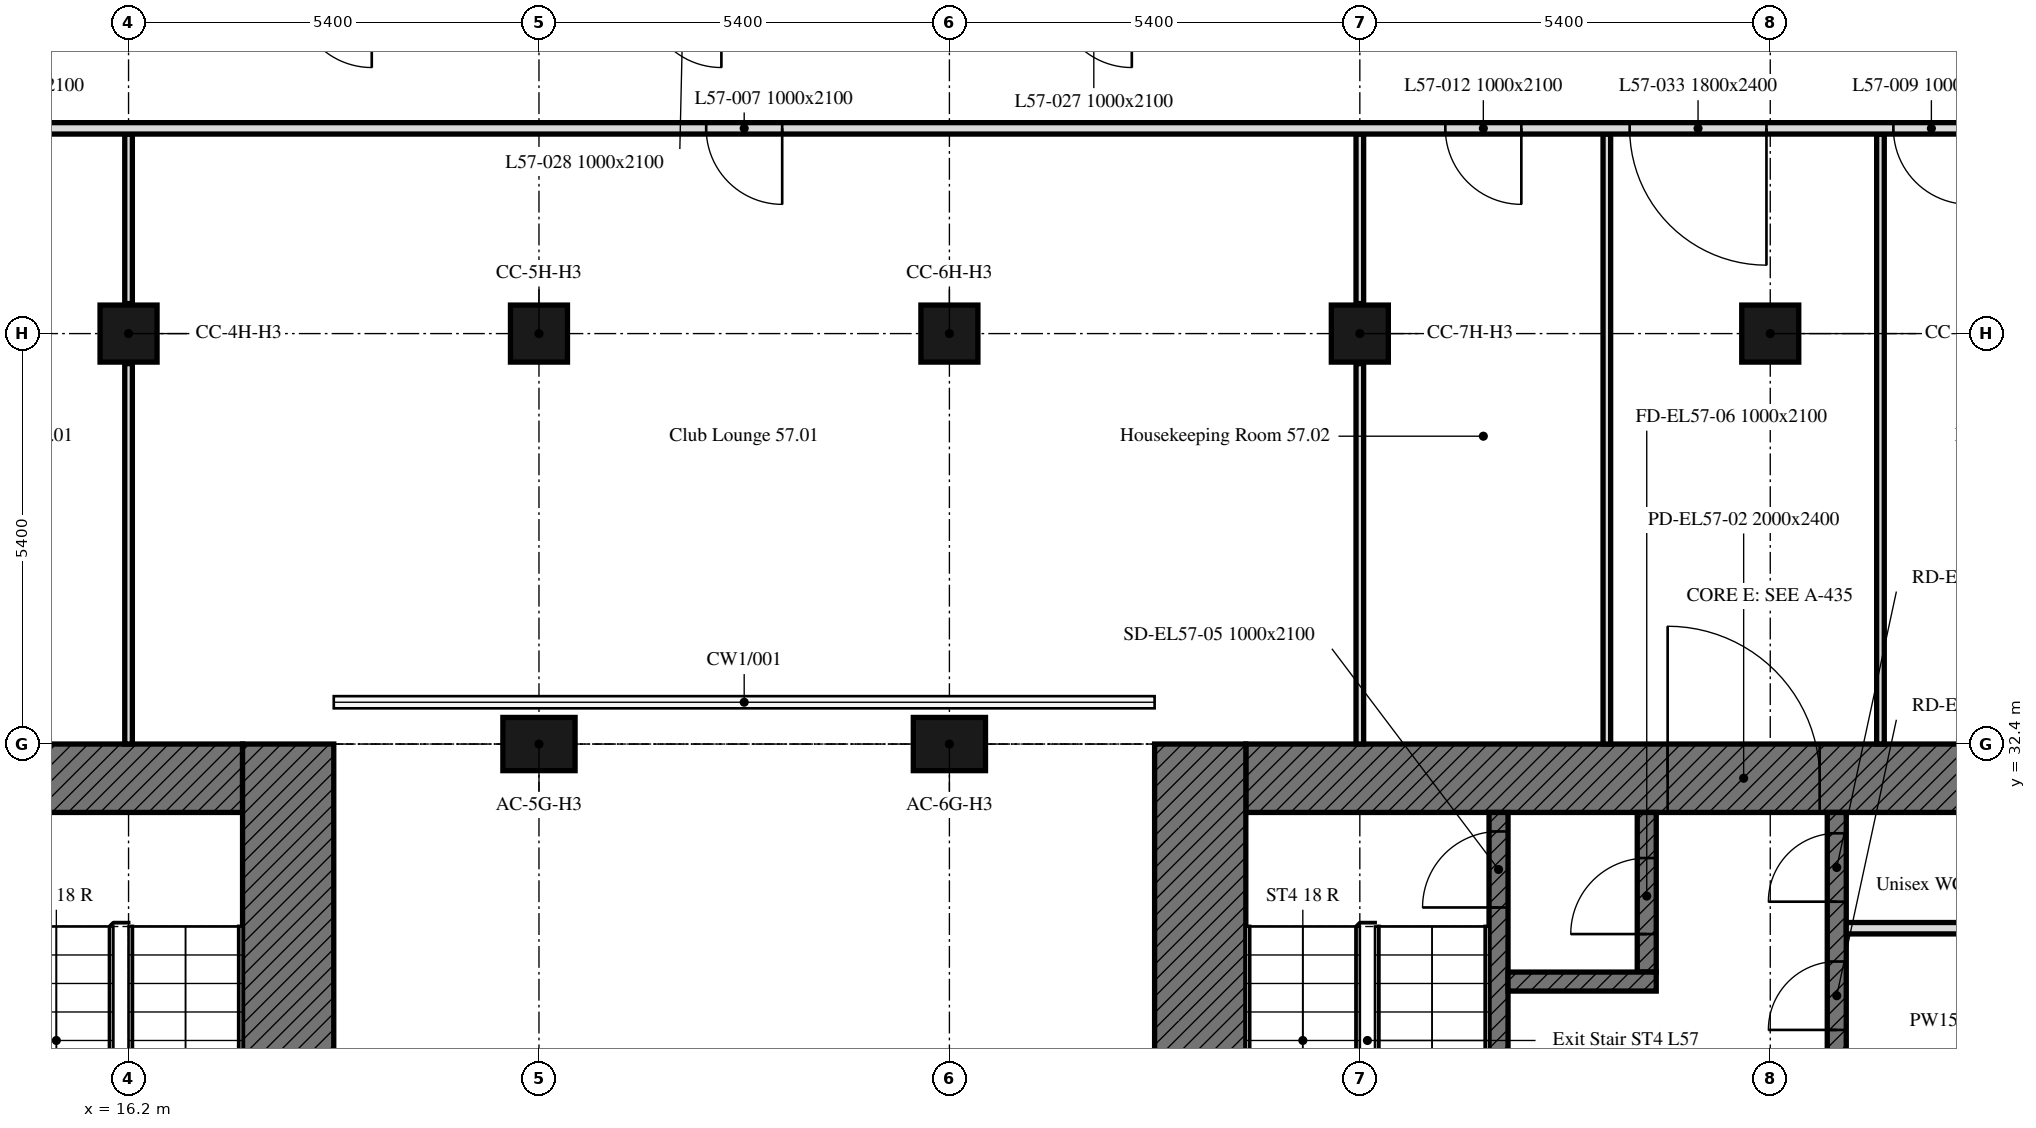
"""IFC4 building model, lengths in metres.
Left out: names, types, materials, properties, quantities, classifications, styles, units other than length and angle.
Written with IfcOpenShell. Run it as: python <this file> out.ifc"""

import sys

from ifc_helpers import new_model, si_unit, direction, frame, frame_2d, origin, origin_2d, place, context, subcontext, project, spatial, rectangle, extrude, element, fill, save


model = new_model("IFC4")
c1 = context("Model", 3, precision=1e-05, world=origin(), true_north=direction((0.0, 1.0)))
c2 = subcontext(c1, "Body", "Model", "MODEL_VIEW")
j1 = project(units=[si_unit("LENGTHUNIT", "METRE"), si_unit("PLANEANGLEUNIT", "RADIAN")], contexts=[c1])
p1 = place(None, origin())
s1 = spatial("IfcSite", under=j1, at=p1, CompositionType="ELEMENT")
p2 = place(p1, origin())
s2 = spatial("IfcBuilding", under=s1, at=p2, CompositionType="ELEMENT")
p3 = place(p2, frame((0.0, 0.0, 226.9)))
s3 = spatial("IfcBuildingStorey", under=s2, at=p3, CompositionType="ELEMENT", Elevation=226.9)
for number, where, z_axis, x_axis in (
    (1, (21.6, 32.4, 0.0), (0.0, 0.0, 1.0), (1.0, 0.0, 0.0)),
    (2, (27.0, 32.4, 0.0), (0.0, 0.0, 1.0), (1.0, 0.0, 0.0)),
):
    element("IfcColumn", number, at=place(p3, frame(where, z_axis=z_axis, x_axis=x_axis)), inside=s3, PredefinedType="COLUMN", context=c2, shape_type="SweptSolid", body=[
        extrude(rectangle(XDim=0.95, YDim=0.7, at=origin_2d()), origin(), (0.0, 0.0, 1.0), 3.0),
    ])
for number, where, z_axis, x_axis in (
    (3, (16.2, 37.8, 0.0), (0.0, 0.0, 1.0), (1.0, 0.0, 0.0)),
    (4, (21.6, 37.8, 0.0), (0.0, 0.0, 1.0), (1.0, 0.0, 0.0)),
    (5, (27.0, 37.8, 0.0), (0.0, 0.0, 1.0), (1.0, 0.0, 0.0)),
    (6, (32.4, 37.8, 0.0), (0.0, 0.0, 1.0), (1.0, 0.0, 0.0)),
    (7, (37.8, 37.8, 0.0), (0.0, 0.0, 1.0), (1.0, 0.0, 0.0)),
):
    element("IfcColumn", number, at=place(p3, frame(where, z_axis=z_axis, x_axis=x_axis)), inside=s3, PredefinedType="COLUMN", context=c2, shape_type="SweptSolid", body=[
        extrude(rectangle(XDim=0.75, YDim=0.75, at=origin_2d()), origin(), (0.0, 0.0, 1.0), 3.0),
    ])
p4 = place(p3, frame((6.6, 31.95, 0.0), z_axis=(0.0, 0.0, 1.0), x_axis=(1.0, 0.0, 0.0)))
e8 = element("IfcWall", 8, at=p4, inside=s3, PredefinedType="SOLIDWALL", context=c2, shape_type="SweptSolid", body=[
    extrude(rectangle(XDim=11.1, YDim=0.9, at=frame_2d((5.55, 0.0))), origin(), (0.0, 0.0, 1.0), 3.0),
])
p5 = place(p4, frame((3.55, 0.0, 0.0)))
e9 = element("IfcOpeningElement", 9, at=p5, cuts=e8, PredefinedType="OPENING", context=c2, shape_type="SweptSolid", body=[
    extrude(rectangle(XDim=2.0, YDim=2.4, at=frame_2d((1.0, 1.2))), frame((0.0, 0.45, 0.0), z_axis=(0.0, -1.0, 0.0), x_axis=(1.0, 0.0, 0.0)), (0.0, 0.0, 1.0), 0.9),
])
p6 = place(p3, frame((18.3, 32.4, 0.0), z_axis=(0.0, 0.0, 1.0), x_axis=(0.0, -1.0, 0.0)))
e10 = element("IfcWall", 10, at=p6, inside=s3, PredefinedType="SOLIDWALL", context=c2, shape_type="SweptSolid", body=[
    extrude(rectangle(XDim=16.2, YDim=1.2, at=frame_2d((8.1, 0.0))), origin(), (0.0, 0.0, 1.0), 3.0),
])
p7 = place(p3, frame((30.9, 31.95, 0.0), z_axis=(0.0, 0.0, 1.0), x_axis=(1.0, 0.0, 0.0)))
e11 = element("IfcWall", 11, at=p7, inside=s3, PredefinedType="SOLIDWALL", context=c2, shape_type="SweptSolid", body=[
    extrude(rectangle(XDim=11.1, YDim=0.9, at=frame_2d((5.55, 0.0))), origin(), (0.0, 0.0, 1.0), 3.0),
])
p8 = place(p7, frame((5.55, 0.0, 0.0)))
e12 = element("IfcOpeningElement", 12, at=p8, cuts=e11, PredefinedType="OPENING", context=c2, shape_type="SweptSolid", body=[
    extrude(rectangle(XDim=2.0, YDim=2.4, at=frame_2d((1.0, 1.2))), frame((0.0, 0.45, 0.0), z_axis=(0.0, -1.0, 0.0), x_axis=(1.0, 0.0, 0.0)), (0.0, 0.0, 1.0), 0.9),
])
p9 = place(p3, frame((30.3, 16.2, 0.0), z_axis=(0.0, 0.0, 1.0), x_axis=(0.0, 1.0, 0.0)))
e13 = element("IfcWall", 13, at=p9, inside=s3, PredefinedType="SOLIDWALL", context=c2, shape_type="SweptSolid", body=[
    extrude(rectangle(XDim=16.2, YDim=1.2, at=frame_2d((8.1, 0.0))), origin(), (0.0, 0.0, 1.0), 3.0),
])
p10 = place(p3, frame((38.675, 17.1, 0.0), z_axis=(0.0, 0.0, 1.0), x_axis=(0.0, 1.0, 0.0)))
e14 = element("IfcWall", 14, at=p10, inside=s3, PredefinedType="SOLIDWALL", context=c2, shape_type="SweptSolid", body=[
    extrude(rectangle(XDim=14.4, YDim=0.25, at=frame_2d((7.2, 0.0))), origin(), (0.0, 0.0, 1.0), 3.0),
])
p11 = place(p10, frame((4.6, 0.0, 0.0)))
e15 = element("IfcOpeningElement", 15, at=p11, cuts=e14, PredefinedType="OPENING", context=c2, shape_type="SweptSolid", body=[
    extrude(rectangle(XDim=1.0, YDim=2.1, at=frame_2d((0.5, 1.05))), frame((0.0, 0.125, 0.0), z_axis=(0.0, -1.0, 0.0), x_axis=(1.0, 0.0, 0.0)), (0.0, 0.0, 1.0), 0.25),
])
p12 = place(p10, frame((7.062, 0.0, 0.0)))
e16 = element("IfcOpeningElement", 16, at=p12, cuts=e14, PredefinedType="OPENING", context=c2, shape_type="SweptSolid", body=[
    extrude(rectangle(XDim=1.2, YDim=2.1, at=frame_2d((0.6, 1.05))), frame((0.0, 0.125, 0.0), z_axis=(0.0, -1.0, 0.0), x_axis=(1.0, 0.0, 0.0)), (0.0, 0.0, 1.0), 0.25),
])
p13 = place(p10, frame((9.726, 0.0, 0.0)))
e17 = element("IfcOpeningElement", 17, at=p13, cuts=e14, PredefinedType="OPENING", context=c2, shape_type="SweptSolid", body=[
    extrude(rectangle(XDim=0.9, YDim=2.1, at=frame_2d((0.45, 1.05))), frame((0.0, 0.125, 0.0), z_axis=(0.0, -1.0, 0.0), x_axis=(1.0, 0.0, 0.0)), (0.0, 0.0, 1.0), 0.25),
])
p14 = place(p10, frame((11.539, 0.0, 0.0)))
e18 = element("IfcOpeningElement", 18, at=p14, cuts=e14, PredefinedType="OPENING", context=c2, shape_type="SweptSolid", body=[
    extrude(rectangle(XDim=0.9, YDim=2.1, at=frame_2d((0.45, 1.05))), frame((0.0, 0.125, 0.0), z_axis=(0.0, -1.0, 0.0), x_axis=(1.0, 0.0, 0.0)), (0.0, 0.0, 1.0), 0.25),
])
p15 = place(p10, frame((13.226, 0.0, 0.0)))
e19 = element("IfcOpeningElement", 19, at=p15, cuts=e14, PredefinedType="OPENING", context=c2, shape_type="SweptSolid", body=[
    extrude(rectangle(XDim=0.9, YDim=2.1, at=frame_2d((0.45, 1.05))), frame((0.0, 0.125, 0.0), z_axis=(0.0, -1.0, 0.0), x_axis=(1.0, 0.0, 0.0)), (0.0, 0.0, 1.0), 0.25),
])
p16 = place(p3, frame((34.225, 17.1, 0.0), z_axis=(0.0, 0.0, 1.0), x_axis=(0.0, 1.0, 0.0)))
e20 = element("IfcWall", 20, at=p16, inside=s3, PredefinedType="SOLIDWALL", context=c2, shape_type="SweptSolid", body=[
    extrude(rectangle(XDim=14.4, YDim=0.25, at=frame_2d((7.2, 0.0))), origin(), (0.0, 0.0, 1.0), 3.0),
])
p17 = place(p16, frame((13.15, 0.0, 0.0)))
e21 = element("IfcOpeningElement", 21, at=p17, cuts=e20, PredefinedType="OPENING", context=c2, shape_type="SweptSolid", body=[
    extrude(rectangle(XDim=1.0, YDim=2.1, at=frame_2d((0.5, 1.05))), frame((0.0, 0.125, 0.0), z_axis=(0.0, -1.0, 0.0), x_axis=(1.0, 0.0, 0.0)), (0.0, 0.0, 1.0), 0.25),
])
p18 = place(p16, frame((0.6, 0.0, 0.0)))
e22 = element("IfcOpeningElement", 22, at=p18, cuts=e20, PredefinedType="OPENING", context=c2, shape_type="SweptSolid", body=[
    extrude(rectangle(XDim=1.1, YDim=2.1, at=frame_2d((0.55, 1.05))), frame((0.0, 0.125, 0.0), z_axis=(0.0, -1.0, 0.0), x_axis=(1.0, 0.0, 0.0)), (0.0, 0.0, 1.0), 0.25),
])
p19 = place(p16, frame((3.25, 0.0, 0.0)))
e23 = element("IfcOpeningElement", 23, at=p19, cuts=e20, PredefinedType="OPENING", context=c2, shape_type="SweptSolid", body=[
    extrude(rectangle(XDim=0.9, YDim=2.1, at=frame_2d((0.45, 1.05))), frame((0.0, 0.125, 0.0), z_axis=(0.0, -1.0, 0.0), x_axis=(1.0, 0.0, 0.0)), (0.0, 0.0, 1.0), 0.25),
])
p20 = place(p3, frame((36.175, 29.4, 0.0), z_axis=(0.0, 0.0, 1.0), x_axis=(0.0, 1.0, 0.0)))
e24 = element("IfcWall", 24, at=p20, inside=s3, PredefinedType="SOLIDWALL", context=c2, shape_type="SweptSolid", body=[
    extrude(rectangle(XDim=2.1, YDim=0.25, at=frame_2d((1.05, 0.0))), origin(), (0.0, 0.0, 1.0), 3.0),
])
p21 = place(p20, frame((0.5, 0.0, 0.0)))
e25 = element("IfcOpeningElement", 25, at=p21, cuts=e24, PredefinedType="OPENING", context=c2, shape_type="SweptSolid", body=[
    extrude(rectangle(XDim=1.0, YDim=2.1, at=frame_2d((0.5, 1.05))), frame((0.0, 0.125, 0.0), z_axis=(0.0, -1.0, 0.0), x_axis=(1.0, 0.0, 0.0)), (0.0, 0.0, 1.0), 0.25),
])
p22 = place(p3, frame((34.35, 29.275, 0.0), z_axis=(0.0, 0.0, 1.0), x_axis=(1.0, 0.0, 0.0)))
e26 = element("IfcWall", 26, at=p22, inside=s3, PredefinedType="SOLIDWALL", context=c2, shape_type="SweptSolid", body=[
    extrude(rectangle(XDim=1.95, YDim=0.25, at=frame_2d((0.975, 0.0))), origin(), (0.0, 0.0, 1.0), 3.0),
])
p23 = place(p3, frame((38.8, 29.977, 0.0), z_axis=(0.0, 0.0, 1.0), x_axis=(1.0, 0.0, 0.0)))
e27 = element("IfcWall", 27, at=p23, inside=s3, PredefinedType="PARTITIONING", context=c2, shape_type="SweptSolid", body=[
    extrude(rectangle(XDim=3.2, YDim=0.15, at=frame_2d((1.6, 0.0))), origin(), (0.0, 0.0, 1.0), 3.0),
])
p24 = place(p3, frame((32.4, 32.4, 0.0), z_axis=(0.0, 0.0, 1.0), x_axis=(0.0, 1.0, 0.0)))
e28 = element("IfcWall", 28, at=p24, inside=s3, PredefinedType="PARTITIONING", context=c2, shape_type="SweptSolid", body=[
    extrude(rectangle(XDim=5.005, YDim=0.1, at=frame_2d((2.502, 0.0))), origin(), (0.0, 0.0, 1.0), 2.4),
])
for number, where, z_axis, x_axis in (
    (29, (32.4, 38.195, 0.0), (0.0, 0.0, 1.0), (0.0, 1.0, 0.0)),
    (30, (16.2, 40.425, 0.0), (0.0, 0.0, 1.0), (0.0, -1.0, 0.0)),
):
    element("IfcWall", number, at=place(p3, frame(where, z_axis=z_axis, x_axis=x_axis)), inside=s3, PredefinedType="PARTITIONING", context=c2, shape_type="SweptSolid", body=[
        extrude(rectangle(XDim=2.23, YDim=0.1, at=frame_2d((1.115, 0.0))), origin(), (0.0, 0.0, 1.0), 2.4),
    ])
p25 = place(p3, frame((16.2, 37.405, 0.0), z_axis=(0.0, 0.0, 1.0), x_axis=(0.0, -1.0, 0.0)))
e31 = element("IfcWall", 31, at=p25, inside=s3, PredefinedType="PARTITIONING", context=c2, shape_type="SweptSolid", body=[
    extrude(rectangle(XDim=5.005, YDim=0.1, at=frame_2d((2.502, 0.0))), origin(), (0.0, 0.0, 1.0), 2.4),
])
for number, where, z_axis, x_axis in (
    (32, (39.25, 32.4, 0.0), (0.0, 0.0, 1.0), (0.0, 1.0, 0.0)),
    (33, (35.65, 40.425, 0.0), (0.0, 0.0, 1.0), (0.0, -1.0, 0.0)),
):
    element("IfcWall", number, at=place(p3, frame(where, z_axis=z_axis, x_axis=x_axis)), inside=s3, PredefinedType="PARTITIONING", context=c2, shape_type="SweptSolid", body=[
        extrude(rectangle(XDim=8.025, YDim=0.1, at=frame_2d((4.013, 0.0))), origin(), (0.0, 0.0, 1.0), 3.0),
    ])
p26 = place(p3, frame((42.449, 40.5, 0.0), z_axis=(0.0, 0.0, 1.0), x_axis=(-1.0, 0.0, 0.0)))
e34 = element("IfcWall", 34, at=p26, inside=s3, PredefinedType="PARTITIONING", context=c2, shape_type="SweptSolid", body=[
    extrude(rectangle(XDim=36.974, YDim=0.15, at=frame_2d((18.487, 0.0))), origin(), (0.0, 0.0, 1.0), 2.4),
])
p27 = place(p26, frame((17.649, 0.0, 0.0)))
e35 = element("IfcOpeningElement", 35, at=p27, cuts=e34, PredefinedType="OPENING", context=c2, shape_type="SweptSolid", body=[
    extrude(rectangle(XDim=1.0, YDim=2.1, at=frame_2d((0.5, 1.05))), frame((0.0, 0.075, 0.0), z_axis=(0.0, -1.0, 0.0), x_axis=(1.0, 0.0, 0.0)), (0.0, 0.0, 1.0), 0.15),
])
p28 = place(p26, frame((2.029, 0.0, 0.0)))
e36 = element("IfcOpeningElement", 36, at=p28, cuts=e34, PredefinedType="OPENING", context=c2, shape_type="SweptSolid", body=[
    extrude(rectangle(XDim=1.0, YDim=2.1, at=frame_2d((0.5, 1.05))), frame((0.0, 0.075, 0.0), z_axis=(0.0, -1.0, 0.0), x_axis=(1.0, 0.0, 0.0)), (0.0, 0.0, 1.0), 0.15),
])
p29 = place(p26, frame((27.374, 0.0, 0.0)))
e37 = element("IfcOpeningElement", 37, at=p29, cuts=e34, PredefinedType="OPENING", context=c2, shape_type="SweptSolid", body=[
    extrude(rectangle(XDim=1.0, YDim=2.1, at=frame_2d((0.5, 1.05))), frame((0.0, 0.075, 0.0), z_axis=(0.0, -1.0, 0.0), x_axis=(1.0, 0.0, 0.0)), (0.0, 0.0, 1.0), 0.15),
])
p30 = place(p26, frame((7.924, 0.0, 0.0)))
e38 = element("IfcOpeningElement", 38, at=p30, cuts=e34, PredefinedType="OPENING", context=c2, shape_type="SweptSolid", body=[
    extrude(rectangle(XDim=1.0, YDim=2.1, at=frame_2d((0.5, 1.05))), frame((0.0, 0.075, 0.0), z_axis=(0.0, -1.0, 0.0), x_axis=(1.0, 0.0, 0.0)), (0.0, 0.0, 1.0), 0.15),
])
p31 = place(p26, frame((4.699, 0.0, 0.0)))
e39 = element("IfcOpeningElement", 39, at=p31, cuts=e34, PredefinedType="OPENING", context=c2, shape_type="SweptSolid", body=[
    extrude(rectangle(XDim=1.8, YDim=2.4, at=frame_2d((0.9, 1.2))), frame((0.0, 0.075, 0.0), z_axis=(0.0, -1.0, 0.0), x_axis=(1.0, 0.0, 0.0)), (0.0, 0.0, 1.0), 0.15),
])
p32 = place(p26, frame((30.199, 0.0, 0.0)))
e40 = element("IfcOpeningElement", 40, at=p32, cuts=e34, PredefinedType="OPENING", context=c2, shape_type="SweptSolid", body=[
    extrude(rectangle(XDim=1.0, YDim=2.1, at=frame_2d((0.5, 1.05))), frame((0.0, 0.075, 0.0), z_axis=(0.0, -1.0, 0.0), x_axis=(1.0, 0.0, 0.0)), (0.0, 0.0, 1.0), 0.15),
])
p33 = place(p8, origin())
e41 = element("IfcDoor", 41, at=p33, inside=s3, OperationType="DOUBLE_DOOR_SINGLE_SWING", PredefinedType="DOOR", context=c2, shape_type="SweptSolid", body=[
    extrude(rectangle(XDim=2.0, YDim=2.4, at=frame_2d((1.0, 1.2))), frame((0.0, 0.025, 0.0), z_axis=(0.0, -1.0, 0.0), x_axis=(1.0, 0.0, 0.0)), (0.0, 0.0, 1.0), 0.05),
])
fill(e12, e41)
p34 = place(p17, origin())
e42 = element("IfcDoor", 42, at=p34, inside=s3, OperationType="SINGLE_SWING_LEFT", PredefinedType="DOOR", context=c2, shape_type="SweptSolid", body=[
    extrude(rectangle(XDim=1.0, YDim=2.1, at=frame_2d((0.5, 1.05))), frame((0.0, 0.025, 0.0), z_axis=(0.0, -1.0, 0.0), x_axis=(1.0, 0.0, 0.0)), (0.0, 0.0, 1.0), 0.05),
])
fill(e21, e42)
p35 = place(p21, origin())
e43 = element("IfcDoor", 43, at=p35, inside=s3, OperationType="SINGLE_SWING_LEFT", PredefinedType="DOOR", context=c2, shape_type="SweptSolid", body=[
    extrude(rectangle(XDim=1.0, YDim=2.1, at=frame_2d((0.5, 1.05))), frame((0.0, 0.025, 0.0), z_axis=(0.0, -1.0, 0.0), x_axis=(1.0, 0.0, 0.0)), (0.0, 0.0, 1.0), 0.05),
])
fill(e25, e43)
p36 = place(p14, origin())
e44 = element("IfcDoor", 44, at=p36, inside=s3, OperationType="SINGLE_SWING_LEFT", PredefinedType="DOOR", context=c2, shape_type="SweptSolid", body=[
    extrude(rectangle(XDim=0.9, YDim=2.1, at=frame_2d((0.45, 1.05))), frame((0.0, 0.025, 0.0), z_axis=(0.0, -1.0, 0.0), x_axis=(1.0, 0.0, 0.0)), (0.0, 0.0, 1.0), 0.05),
])
fill(e18, e44)
p37 = place(p15, origin())
e45 = element("IfcDoor", 45, at=p37, inside=s3, OperationType="SINGLE_SWING_LEFT", PredefinedType="DOOR", context=c2, shape_type="SweptSolid", body=[
    extrude(rectangle(XDim=0.9, YDim=2.1, at=frame_2d((0.45, 1.05))), frame((0.0, 0.025, 0.0), z_axis=(0.0, -1.0, 0.0), x_axis=(1.0, 0.0, 0.0)), (0.0, 0.0, 1.0), 0.05),
])
fill(e19, e45)
p38 = place(p27, origin())
e46 = element("IfcDoor", 46, at=p38, inside=s3, OperationType="SINGLE_SWING_RIGHT", PredefinedType="DOOR", context=c2, shape_type="SweptSolid", body=[
    extrude(rectangle(XDim=1.0, YDim=2.1, at=frame_2d((0.5, 1.05))), frame((0.0, 0.025, 0.0), z_axis=(0.0, -1.0, 0.0), x_axis=(1.0, 0.0, 0.0)), (0.0, 0.0, 1.0), 0.05),
])
fill(e35, e46)
p39 = place(p28, origin())
e47 = element("IfcDoor", 47, at=p39, inside=s3, OperationType="SINGLE_SWING_LEFT", PredefinedType="DOOR", context=c2, shape_type="SweptSolid", body=[
    extrude(rectangle(XDim=1.0, YDim=2.1, at=frame_2d((0.5, 1.05))), frame((0.0, 0.025, 0.0), z_axis=(0.0, -1.0, 0.0), x_axis=(1.0, 0.0, 0.0)), (0.0, 0.0, 1.0), 0.05),
])
fill(e36, e47)
p40 = place(p30, origin())
e48 = element("IfcDoor", 48, at=p40, inside=s3, OperationType="SINGLE_SWING_RIGHT", PredefinedType="DOOR", context=c2, shape_type="SweptSolid", body=[
    extrude(rectangle(XDim=1.0, YDim=2.1, at=frame_2d((0.5, 1.05))), frame((0.0, 0.025, 0.0), z_axis=(0.0, -1.0, 0.0), x_axis=(1.0, 0.0, 0.0)), (0.0, 0.0, 1.0), 0.05),
])
fill(e38, e48)
p41 = place(p31, origin())
e49 = element("IfcDoor", 49, at=p41, inside=s3, OperationType="DOUBLE_DOOR_SINGLE_SWING", PredefinedType="DOOR", context=c2, shape_type="SweptSolid", body=[
    extrude(rectangle(XDim=1.8, YDim=2.4, at=frame_2d((0.9, 1.2))), frame((0.0, 0.025, 0.0), z_axis=(0.0, -1.0, 0.0), x_axis=(1.0, 0.0, 0.0)), (0.0, 0.0, 1.0), 0.05),
])
fill(e39, e49)
save(model, sys.argv[1])
